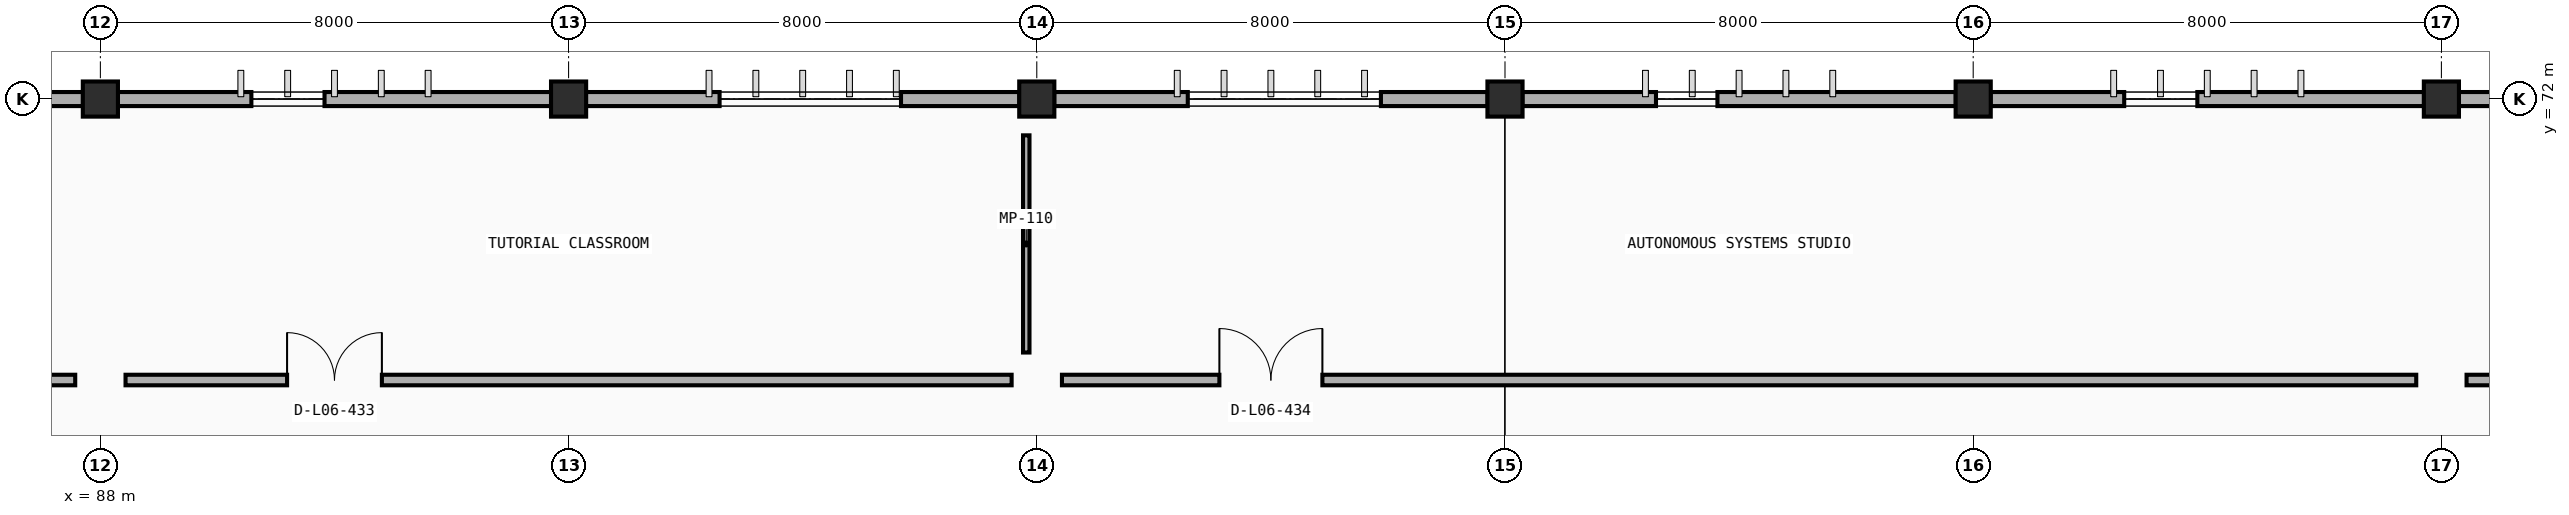
"""IFC4 building model, lengths in metres.
Left out: names, types, materials, properties, quantities, classifications, styles, units other than length and angle.
Written with IfcOpenShell. Run it as: python <this file> out.ifc"""

import sys

from ifc_helpers import new_model, si_unit, direction, frame, frame_2d, origin, origin_2d, place, context, subcontext, project, spatial, rectangle, extrude, element, fill, save


model = new_model("IFC4")
c1 = context("Model", 3, precision=1e-05, world=origin(), true_north=direction((0.0, 1.0)))
c2 = subcontext(c1, "Body", "Model", "MODEL_VIEW")
j1 = project(units=[si_unit("LENGTHUNIT", "METRE"), si_unit("PLANEANGLEUNIT", "RADIAN")], contexts=[c1])
p1 = place(None, origin())
s1 = spatial("IfcSite", under=j1, at=p1, CompositionType="ELEMENT")
p2 = place(p1, origin())
s2 = spatial("IfcBuilding", under=s1, at=p2, CompositionType="ELEMENT")
p3 = place(p2, frame((0.0, 0.0, 22.2)))
s3 = spatial("IfcBuildingStorey", under=s2, at=p3, CompositionType="ELEMENT", Elevation=22.2)
for number, where, z_axis, x_axis in (
    (1, (88.0, 72.0, 0.0), (0.0, 0.0, 1.0), (1.0, 0.0, 0.0)),
    (2, (96.0, 72.0, 0.0), (0.0, 0.0, 1.0), (1.0, 0.0, 0.0)),
    (3, (104.0, 72.0, 0.0), (0.0, 0.0, 1.0), (1.0, 0.0, 0.0)),
    (4, (112.0, 72.0, 0.0), (0.0, 0.0, 1.0), (1.0, 0.0, 0.0)),
    (5, (120.0, 72.0, 0.0), (0.0, 0.0, 1.0), (1.0, 0.0, 0.0)),
    (6, (128.0, 72.0, 0.0), (0.0, 0.0, 1.0), (1.0, 0.0, 0.0)),
):
    element("IfcColumn", number, at=place(p3, frame(where, z_axis=z_axis, x_axis=x_axis)), inside=s3, PredefinedType="COLUMN", context=c2, shape_type="SweptSolid", body=[
        extrude(rectangle(XDim=0.6, YDim=0.6, at=origin_2d()), origin(), (0.0, 0.0, 1.0), 4.2),
    ])
p4 = place(p3, frame((80.297, 72.0, 0.0), z_axis=(0.0, 0.0, 1.0), x_axis=(1.0, 0.0, 0.0)))
e7 = element("IfcWall", 7, at=p4, inside=s3, PredefinedType="STANDARD", context=c2, shape_type="SweptSolid", body=[
    extrude(rectangle(XDim=7.406, YDim=0.24, at=frame_2d((3.703, 0.0))), origin(), (0.0, 0.0, 1.0), 3.335),
])
p5 = place(p4, frame((2.283, 0.0, 0.9)))
e8 = element("IfcOpeningElement", 8, at=p5, cuts=e7, PredefinedType="OPENING", context=c2, shape_type="SweptSolid", body=[
    extrude(rectangle(XDim=1.05, YDim=1.25, at=frame_2d((0.525, 0.625))), frame((0.0, 0.13, 0.0), z_axis=(0.0, -1.0, 0.0), x_axis=(1.0, 0.0, 0.0)), (0.0, 0.0, 1.0), 0.26),
])
p6 = place(p3, frame((88.297, 72.0, 0.0), z_axis=(0.0, 0.0, 1.0), x_axis=(1.0, 0.0, 0.0)))
e9 = element("IfcWall", 9, at=p6, inside=s3, PredefinedType="STANDARD", context=c2, shape_type="SweptSolid", body=[
    extrude(rectangle(XDim=7.406, YDim=0.24, at=frame_2d((3.703, 0.0))), origin(), (0.0, 0.0, 1.0), 3.335),
])
p7 = place(p6, frame((2.283, 0.0, 0.9)))
e10 = element("IfcOpeningElement", 10, at=p7, cuts=e9, PredefinedType="OPENING", context=c2, shape_type="SweptSolid", body=[
    extrude(rectangle(XDim=1.25, YDim=1.25, at=frame_2d((0.625, 0.625))), frame((0.0, 0.13, 0.0), z_axis=(0.0, -1.0, 0.0), x_axis=(1.0, 0.0, 0.0)), (0.0, 0.0, 1.0), 0.26),
])
p8 = place(p3, frame((96.297, 72.0, 0.0), z_axis=(0.0, 0.0, 1.0), x_axis=(1.0, 0.0, 0.0)))
e11 = element("IfcWall", 11, at=p8, inside=s3, PredefinedType="STANDARD", context=c2, shape_type="SweptSolid", body=[
    extrude(rectangle(XDim=7.406, YDim=0.24, at=frame_2d((3.703, 0.0))), origin(), (0.0, 0.0, 1.0), 3.335),
])
p9 = place(p8, frame((2.283, 0.0, 0.9)))
e12 = element("IfcOpeningElement", 12, at=p9, cuts=e11, PredefinedType="OPENING", context=c2, shape_type="SweptSolid", body=[
    extrude(rectangle(XDim=3.1, YDim=1.6, at=frame_2d((1.55, 0.8))), frame((0.0, 0.13, 0.0), z_axis=(0.0, -1.0, 0.0), x_axis=(1.0, 0.0, 0.0)), (0.0, 0.0, 1.0), 0.26),
])
p10 = place(p3, frame((104.297, 72.0, 0.0), z_axis=(0.0, 0.0, 1.0), x_axis=(1.0, 0.0, 0.0)))
e13 = element("IfcWall", 13, at=p10, inside=s3, PredefinedType="STANDARD", context=c2, shape_type="SweptSolid", body=[
    extrude(rectangle(XDim=7.406, YDim=0.24, at=frame_2d((3.703, 0.0))), origin(), (0.0, 0.0, 1.0), 3.335),
])
p11 = place(p10, frame((2.283, 0.0, 0.9)))
e14 = element("IfcOpeningElement", 14, at=p11, cuts=e13, PredefinedType="OPENING", context=c2, shape_type="SweptSolid", body=[
    extrude(rectangle(XDim=3.3, YDim=1.75, at=frame_2d((1.65, 0.875))), frame((0.0, 0.13, 0.0), z_axis=(0.0, -1.0, 0.0), x_axis=(1.0, 0.0, 0.0)), (0.0, 0.0, 1.0), 0.26),
])
p12 = place(p3, frame((112.297, 72.0, 0.0), z_axis=(0.0, 0.0, 1.0), x_axis=(1.0, 0.0, 0.0)))
e15 = element("IfcWall", 15, at=p12, inside=s3, PredefinedType="STANDARD", context=c2, shape_type="SweptSolid", body=[
    extrude(rectangle(XDim=7.406, YDim=0.24, at=frame_2d((3.703, 0.0))), origin(), (0.0, 0.0, 1.0), 3.335),
])
p13 = place(p12, frame((2.283, 0.0, 0.9)))
e16 = element("IfcOpeningElement", 16, at=p13, cuts=e15, PredefinedType="OPENING", context=c2, shape_type="SweptSolid", body=[
    extrude(rectangle(XDim=1.05, YDim=1.25, at=frame_2d((0.525, 0.625))), frame((0.0, 0.13, 0.0), z_axis=(0.0, -1.0, 0.0), x_axis=(1.0, 0.0, 0.0)), (0.0, 0.0, 1.0), 0.26),
])
p14 = place(p3, frame((120.297, 72.0, 0.0), z_axis=(0.0, 0.0, 1.0), x_axis=(1.0, 0.0, 0.0)))
e17 = element("IfcWall", 17, at=p14, inside=s3, PredefinedType="STANDARD", context=c2, shape_type="SweptSolid", body=[
    extrude(rectangle(XDim=7.406, YDim=0.24, at=frame_2d((3.703, 0.0))), origin(), (0.0, 0.0, 1.0), 3.335),
])
p15 = place(p14, frame((2.283, 0.0, 0.9)))
e18 = element("IfcOpeningElement", 18, at=p15, cuts=e17, PredefinedType="OPENING", context=c2, shape_type="SweptSolid", body=[
    extrude(rectangle(XDim=1.25, YDim=1.25, at=frame_2d((0.625, 0.625))), frame((0.0, 0.13, 0.0), z_axis=(0.0, -1.0, 0.0), x_axis=(1.0, 0.0, 0.0)), (0.0, 0.0, 1.0), 0.26),
])
p16 = place(p3, frame((128.297, 72.0, 0.0), z_axis=(0.0, 0.0, 1.0), x_axis=(1.0, 0.0, 0.0)))
e19 = element("IfcWall", 19, at=p16, inside=s3, PredefinedType="STANDARD", context=c2, shape_type="SweptSolid", body=[
    extrude(rectangle(XDim=7.406, YDim=0.24, at=frame_2d((3.703, 0.0))), origin(), (0.0, 0.0, 1.0), 3.335),
])
p17 = place(p16, frame((2.283, 0.0, 0.9)))
e20 = element("IfcOpeningElement", 20, at=p17, cuts=e19, PredefinedType="OPENING", context=c2, shape_type="SweptSolid", body=[
    extrude(rectangle(XDim=3.1, YDim=1.6, at=frame_2d((1.55, 0.8))), frame((0.0, 0.13, 0.0), z_axis=(0.0, -1.0, 0.0), x_axis=(1.0, 0.0, 0.0)), (0.0, 0.0, 1.0), 0.26),
])
p18 = place(p3, frame((64.43, 67.2, 0.0), z_axis=(0.0, 0.0, 1.0), x_axis=(1.0, 0.0, 0.0)))
e21 = element("IfcWall", 21, at=p18, inside=s3, PredefinedType="PARTITIONING", context=c2, shape_type="SweptSolid", body=[
    extrude(rectangle(XDim=23.14, YDim=0.18, at=frame_2d((11.57, 0.0))), origin(), (0.0, 0.0, 1.0), 3.3),
])
p19 = place(p18, frame((2.66, 0.0, 0.0)))
e22 = element("IfcOpeningElement", 22, at=p19, cuts=e21, PredefinedType="OPENING", context=c2, shape_type="SweptSolid", body=[
    extrude(rectangle(XDim=1.82, YDim=2.25, at=frame_2d((0.91, 1.125))), frame((0.0, 0.1, 0.0), z_axis=(0.0, -1.0, 0.0), x_axis=(1.0, 0.0, 0.0)), (0.0, 0.0, 1.0), 0.2),
])
p20 = place(p3, frame((88.43, 67.2, 0.0), z_axis=(0.0, 0.0, 1.0), x_axis=(1.0, 0.0, 0.0)))
e23 = element("IfcWall", 23, at=p20, inside=s3, PredefinedType="PARTITIONING", context=c2, shape_type="SweptSolid", body=[
    extrude(rectangle(XDim=15.14, YDim=0.18, at=frame_2d((7.57, 0.0))), origin(), (0.0, 0.0, 1.0), 3.3),
])
p21 = place(p20, frame((2.76, 0.0, 0.0)))
e24 = element("IfcOpeningElement", 24, at=p21, cuts=e23, PredefinedType="OPENING", context=c2, shape_type="SweptSolid", body=[
    extrude(rectangle(XDim=1.62, YDim=2.2, at=frame_2d((0.81, 1.1))), frame((0.0, 0.1, 0.0), z_axis=(0.0, -1.0, 0.0), x_axis=(1.0, 0.0, 0.0)), (0.0, 0.0, 1.0), 0.2),
])
p22 = place(p3, frame((103.82, 67.67, 0.0), z_axis=(0.0, 0.0, 1.0), x_axis=(0.0, 1.0, 0.0)))
e25 = element("IfcWall", 25, at=p22, inside=s3, PredefinedType="MOVABLE", context=c2, shape_type="SweptSolid", body=[
    extrude(rectangle(XDim=3.71, YDim=0.11, at=frame_2d((1.855, 0.0))), origin(), (0.0, 0.0, 1.0), 3.3),
])
p23 = place(p3, frame((104.43, 67.2, 0.0), z_axis=(0.0, 0.0, 1.0), x_axis=(1.0, 0.0, 0.0)))
e26 = element("IfcWall", 26, at=p23, inside=s3, PredefinedType="PARTITIONING", context=c2, shape_type="SweptSolid", body=[
    extrude(rectangle(XDim=23.14, YDim=0.18, at=frame_2d((11.57, 0.0))), origin(), (0.0, 0.0, 1.0), 3.3),
])
p24 = place(p23, frame((2.69, 0.0, 0.0)))
e27 = element("IfcOpeningElement", 27, at=p24, cuts=e26, PredefinedType="OPENING", context=c2, shape_type="SweptSolid", body=[
    extrude(rectangle(XDim=1.76, YDim=2.25, at=frame_2d((0.88, 1.125))), frame((0.0, 0.1, 0.0), z_axis=(0.0, -1.0, 0.0), x_axis=(1.0, 0.0, 0.0)), (0.0, 0.0, 1.0), 0.2),
])
p25 = place(p3, frame((128.43, 67.2, 0.0), z_axis=(0.0, 0.0, 1.0), x_axis=(1.0, 0.0, 0.0)))
e28 = element("IfcWall", 28, at=p25, inside=s3, PredefinedType="PARTITIONING", context=c2, shape_type="SweptSolid", body=[
    extrude(rectangle(XDim=31.14, YDim=0.18, at=frame_2d((15.57, 0.0))), origin(), (0.0, 0.0, 1.0), 3.3),
])
p26 = place(p25, frame((2.96, 0.0, 0.0)))
e29 = element("IfcOpeningElement", 29, at=p26, cuts=e28, PredefinedType="OPENING", context=c2, shape_type="SweptSolid", body=[
    extrude(rectangle(XDim=1.22, YDim=2.18, at=frame_2d((0.61, 1.09))), frame((0.0, 0.1, 0.0), z_axis=(0.0, -1.0, 0.0), x_axis=(1.0, 0.0, 0.0)), (0.0, 0.0, 1.0), 0.2),
])
p27 = place(p7, origin())
e30 = element("IfcWindow", 30, at=p27, inside=s3, PartitioningType="SINGLE_PANEL", PredefinedType="WINDOW", context=c2, shape_type="SweptSolid", body=[
    extrude(rectangle(XDim=1.25, YDim=1.25, at=frame_2d((0.625, 0.625))), frame((0.0, 0.03, 0.0), z_axis=(0.0, -1.0, 0.0), x_axis=(1.0, 0.0, 0.0)), (0.0, 0.0, 1.0), 0.06),
])
fill(e10, e30)
p28 = place(p9, origin())
e31 = element("IfcWindow", 31, at=p28, inside=s3, PartitioningType="DOUBLE_PANEL_VERTICAL", PredefinedType="WINDOW", context=c2, shape_type="SweptSolid", body=[
    extrude(rectangle(XDim=3.1, YDim=1.6, at=frame_2d((1.55, 0.8))), frame((0.0, 0.03, 0.0), z_axis=(0.0, -1.0, 0.0), x_axis=(1.0, 0.0, 0.0)), (0.0, 0.0, 1.0), 0.06),
])
fill(e12, e31)
p29 = place(p11, origin())
e32 = element("IfcWindow", 32, at=p29, inside=s3, PartitioningType="DOUBLE_PANEL_VERTICAL", PredefinedType="WINDOW", context=c2, shape_type="SweptSolid", body=[
    extrude(rectangle(XDim=3.3, YDim=1.75, at=frame_2d((1.65, 0.875))), frame((0.0, 0.03, 0.0), z_axis=(0.0, -1.0, 0.0), x_axis=(1.0, 0.0, 0.0)), (0.0, 0.0, 1.0), 0.06),
])
fill(e14, e32)
p30 = place(p13, origin())
e33 = element("IfcWindow", 33, at=p30, inside=s3, PartitioningType="SINGLE_PANEL", PredefinedType="WINDOW", context=c2, shape_type="SweptSolid", body=[
    extrude(rectangle(XDim=1.05, YDim=1.25, at=frame_2d((0.525, 0.625))), frame((0.0, 0.03, 0.0), z_axis=(0.0, -1.0, 0.0), x_axis=(1.0, 0.0, 0.0)), (0.0, 0.0, 1.0), 0.06),
])
fill(e16, e33)
p31 = place(p15, origin())
e34 = element("IfcWindow", 34, at=p31, inside=s3, PartitioningType="SINGLE_PANEL", PredefinedType="WINDOW", context=c2, shape_type="SweptSolid", body=[
    extrude(rectangle(XDim=1.25, YDim=1.25, at=frame_2d((0.625, 0.625))), frame((0.0, 0.03, 0.0), z_axis=(0.0, -1.0, 0.0), x_axis=(1.0, 0.0, 0.0)), (0.0, 0.0, 1.0), 0.06),
])
fill(e18, e34)
p32 = place(p21, origin())
e35 = element("IfcDoor", 35, at=p32, inside=s3, OperationType="DOUBLE_DOOR_SINGLE_SWING", PredefinedType="DOOR", context=c2, shape_type="SweptSolid", body=[
    extrude(rectangle(XDim=1.62, YDim=2.2, at=frame_2d((0.81, 1.1))), frame((0.0, 0.025, 0.0), z_axis=(0.0, -1.0, 0.0), x_axis=(1.0, 0.0, 0.0)), (0.0, 0.0, 1.0), 0.05),
])
fill(e24, e35)
p33 = place(p24, origin())
e36 = element("IfcDoor", 36, at=p33, inside=s3, OperationType="DOUBLE_DOOR_SINGLE_SWING", PredefinedType="DOOR", context=c2, shape_type="SweptSolid", body=[
    extrude(rectangle(XDim=1.76, YDim=2.25, at=frame_2d((0.88, 1.125))), frame((0.0, 0.025, 0.0), z_axis=(0.0, -1.0, 0.0), x_axis=(1.0, 0.0, 0.0)), (0.0, 0.0, 1.0), 0.05),
])
fill(e27, e36)
save(model, sys.argv[1])
